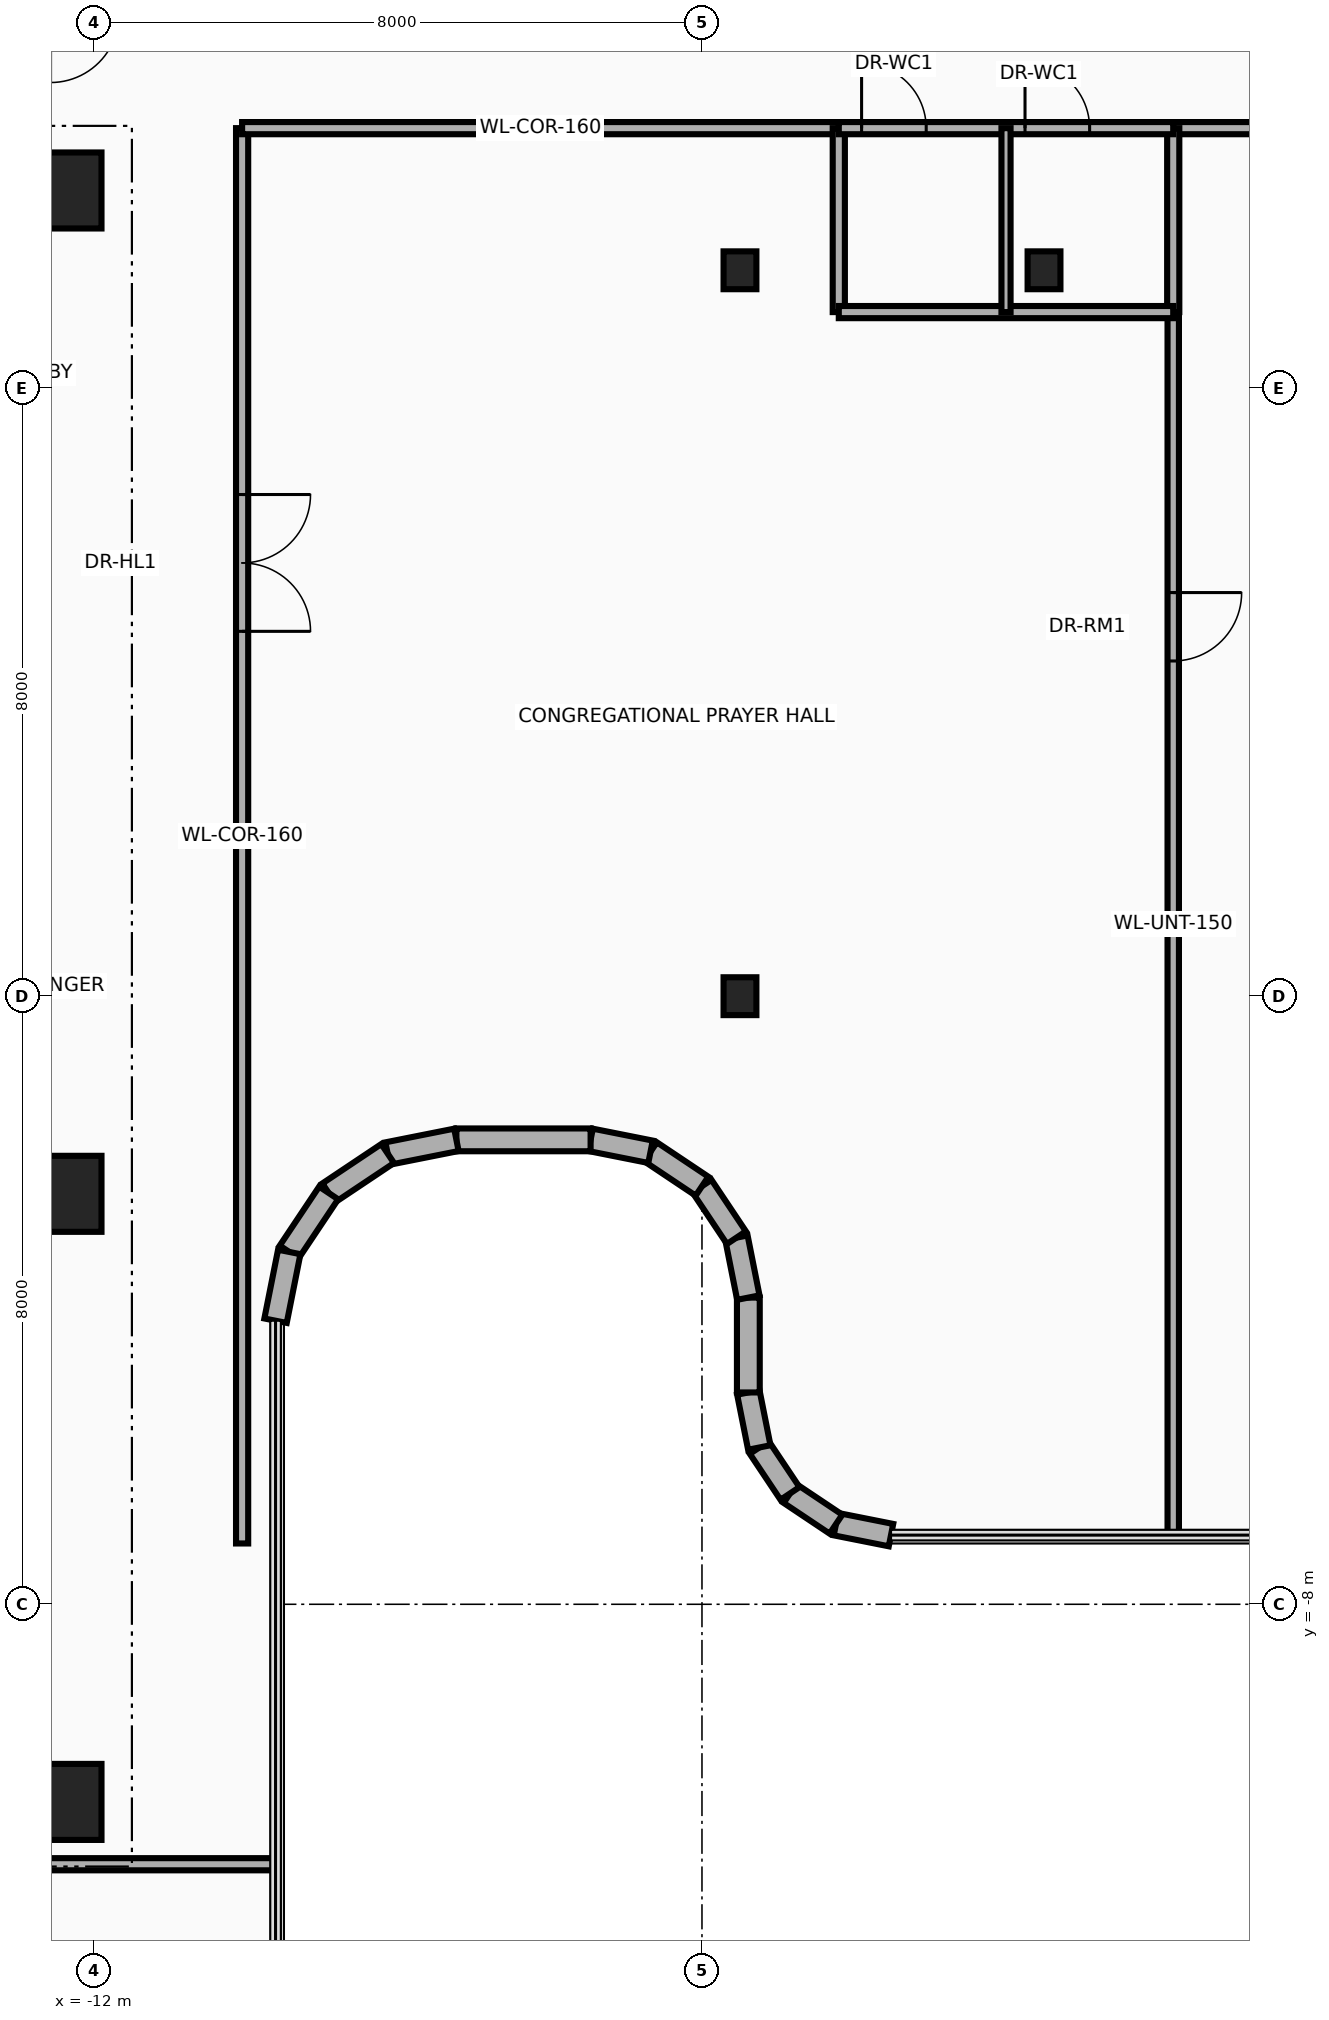
"""IFC4 building model, lengths in metres.
Left out: names, types, materials, properties, quantities, classifications, styles, units other than length and angle.
Written with IfcOpenShell. Run it as: python <this file> out.ifc"""

import sys

from ifc_helpers import new_model, si_unit, direction, frame, frame_2d, origin, origin_2d, place, context, subcontext, project, spatial, rectangle, i_section, extrude, source, transform, mapped, element, fill, save


model = new_model("IFC4")
c1 = context("Model", 3, precision=1e-05, world=origin(), true_north=direction((0.0, 1.0)))
c2 = subcontext(c1, "Body", "Model", "MODEL_VIEW")
j1 = project(units=[si_unit("LENGTHUNIT", "METRE"), si_unit("PLANEANGLEUNIT", "RADIAN")], contexts=[c1])
p1 = place(None, origin())
s1 = spatial("IfcSite", under=j1, at=p1, CompositionType="ELEMENT")
p2 = place(p1, origin())
s2 = spatial("IfcBuilding", under=s1, at=p2, CompositionType="ELEMENT")
p3 = place(p2, frame((0.0, 0.0, 188.4)))
s3 = spatial("IfcBuildingStorey", under=s2, at=p3, CompositionType="ELEMENT", Elevation=188.4)
for number, where, z_axis, x_axis in (
    (1, (-22.65, 10.8, 0.0), (0.0, 0.0, 1.0), (1.0, 0.0, 0.0)),
    (2, (-22.65, -10.8, 0.0), (0.0, 0.0, 1.0), (1.0, 0.0, 0.0)),
):
    element("IfcWall", number, at=place(p3, frame(where, z_axis=z_axis, x_axis=x_axis)), inside=s3, PredefinedType="SHEAR", context=c2, shape_type="SweptSolid", body=[
        extrude(rectangle(XDim=10.25, YDim=0.55, at=frame_2d((5.125, 0.0))), origin(), (0.0, 0.0, 1.0), 3.63),
    ])
m1 = source(origin(), c2, "Body", "SweptSolid", [
    extrude(rectangle(XDim=1.0, YDim=1.0, at=origin_2d()), origin(), (0.0, 0.0, 1.0), 3.95),
])
for number, where, z_axis, x_axis in (
    (3, (-12.4, -10.6, 0.0), (0.0, 0.0, 1.0), (1.0, 0.0, 0.0)),
    (4, (-12.4, -2.6, 0.0), (0.0, 0.0, 1.0), (1.0, 0.0, 0.0)),
    (5, (-12.4, 10.6, 0.0), (0.0, 0.0, 1.0), (1.0, 0.0, 0.0)),
):
    element("IfcColumn", number, at=place(p3, frame(where, z_axis=z_axis, x_axis=x_axis)), inside=s3, PredefinedType="COLUMN", context=c2, shape_type="MappedRepresentation", body=[
        mapped(m1, transform((0.0, 0.0, 0.0), x_axis=(1.0, 0.0, 0.0), y_axis=(0.0, 1.0, 0.0), z_axis=(0.0, 0.0, 1.0), scale=1.0)),
    ])
m2 = source(origin(), c2, "Body", "SweptSolid", [
    extrude(i_section(OverallWidth=0.432, OverallDepth=0.498, WebThickness=0.056, FlangeThickness=0.089, at=origin_2d()), origin(), (0.0, 0.0, 1.0), 3.95),
])
for number, where, z_axis, x_axis in (
    (6, (-3.5, 0.0, 0.0), (0.0, 0.0, 1.0), (1.0, 0.0, 0.0)),
    (7, (-3.5, 9.55, 0.0), (0.0, 0.0, 1.0), (1.0, 0.0, 0.0)),
    (8, (0.5, 9.55, 0.0), (0.0, 0.0, 1.0), (1.0, 0.0, 0.0)),
):
    element("IfcColumn", number, at=place(p3, frame(where, z_axis=z_axis, x_axis=x_axis)), inside=s3, PredefinedType="COLUMN", context=c2, shape_type="MappedRepresentation", body=[
        mapped(m2, transform((0.0, 0.0, 0.0), x_axis=(1.0, 0.0, 0.0), y_axis=(0.0, 1.0, 0.0), z_axis=(0.0, 0.0, 1.0), scale=1.0)),
    ])
p4 = place(p3, frame((-1.513, -7.09, 0.0), z_axis=(0.0, 0.0, 1.0), x_axis=(-0.980783640462, 0.195098566376, 0.0)))
e9 = element("IfcWall", 9, at=p4, inside=s3, PredefinedType="SOLIDWALL", context=c2, shape_type="SweptSolid", body=[
    extrude(rectangle(XDim=0.738, YDim=0.3, at=frame_2d((0.369, 0.0))), origin(), (0.0, 0.0, 1.0), 3.076),
])
p5 = place(p3, frame((-2.237, -6.946, 0.0), z_axis=(0.0, 0.0, 1.0), x_axis=(-0.831378135196, 0.555707113792, 0.0)))
e10 = element("IfcWall", 10, at=p5, inside=s3, PredefinedType="SOLIDWALL", context=c2, shape_type="SweptSolid", body=[
    extrude(rectangle(XDim=0.727, YDim=0.3, at=frame_2d((0.364, 0.0))), origin(), (0.0, 0.0, 1.0), 3.63),
])
p6 = place(p3, frame((-2.842, -6.542, 0.0), z_axis=(0.0, 0.0, 1.0), x_axis=(-0.555784030735, 0.83132671747, 0.0)))
e11 = element("IfcWall", 11, at=p6, inside=s3, PredefinedType="SOLIDWALL", context=c2, shape_type="SweptSolid", body=[
    extrude(rectangle(XDim=0.728, YDim=0.3, at=frame_2d((0.364, 0.0))), origin(), (0.0, 0.0, 1.0), 2.615),
])
p7 = place(p3, frame((-3.246, -5.937, 0.0), z_axis=(0.0, 0.0, 1.0), x_axis=(-0.194780446724, 0.980846867546, 0.0)))
e12 = element("IfcWall", 12, at=p7, inside=s3, PredefinedType="SOLIDWALL", context=c2, shape_type="SweptSolid", body=[
    extrude(rectangle(XDim=0.738, YDim=0.3, at=frame_2d((0.369, 0.0))), origin(), (0.0, 0.0, 1.0), 2.615),
])
p8 = place(p3, frame((-3.39, -5.213, 0.0), z_axis=(0.0, 0.0, 1.0), x_axis=(0.0, 1.0, 0.0)))
e13 = element("IfcWall", 13, at=p8, inside=s3, PredefinedType="SOLIDWALL", context=c2, shape_type="SweptSolid", body=[
    extrude(rectangle(XDim=1.248, YDim=0.3, at=frame_2d((0.624, 0.0))), origin(), (0.0, 0.0, 1.0), 2.615),
])
p9 = place(p3, frame((-3.39, -3.965, 0.0), z_axis=(0.0, 0.0, 1.0), x_axis=(-0.195356525272, 0.980732291726, 0.0)))
e14 = element("IfcWall", 14, at=p9, inside=s3, PredefinedType="SOLIDWALL", context=c2, shape_type="SweptSolid", body=[
    extrude(rectangle(XDim=0.803, YDim=0.3, at=frame_2d((0.402, 0.0))), origin(), (0.0, 0.0, 1.0), 2.615),
])
for number, where, z_axis, x_axis in (
    (15, (-3.547, -3.177, 0.0), (0.0, 0.0, 1.0), (-0.556, 0.831, 0.0)),
    (16, (-4.0, -2.5, 0.0), (0.0, 0.0, 1.0), (-0.831, 0.556, 0.0)),
):
    element("IfcWall", number, at=place(p3, frame(where, z_axis=z_axis, x_axis=x_axis)), inside=s3, PredefinedType="SOLIDWALL", context=c2, shape_type="SweptSolid", body=[
        extrude(rectangle(XDim=0.815, YDim=0.3, at=frame_2d((0.407, 0.0))), origin(), (0.0, 0.0, 1.0), 2.615),
    ])
p10 = place(p3, frame((-4.677, -2.047, 0.0), z_axis=(0.0, 0.0, 1.0), x_axis=(-0.980732291726, 0.195356525272, 0.0)))
e17 = element("IfcWall", 17, at=p10, inside=s3, PredefinedType="SOLIDWALL", context=c2, shape_type="SweptSolid", body=[
    extrude(rectangle(XDim=0.803, YDim=0.3, at=frame_2d((0.402, 0.0))), origin(), (0.0, 0.0, 1.0), 3.63),
])
p11 = place(p3, frame((-5.465, -1.89, 0.0), z_axis=(0.0, 0.0, 1.0), x_axis=(-1.0, 0.0, 0.0)))
e18 = element("IfcWall", 18, at=p11, inside=s3, PredefinedType="SOLIDWALL", context=c2, shape_type="SweptSolid", body=[
    extrude(rectangle(XDim=1.766, YDim=0.3, at=frame_2d((0.883, 0.0))), origin(), (0.0, 0.0, 1.0), 3.63),
])
p12 = place(p3, frame((-7.231, -1.89, 0.0), z_axis=(0.0, 0.0, 1.0), x_axis=(-0.980743190895, -0.195301801101, 0.0)))
e19 = element("IfcWall", 19, at=p12, inside=s3, PredefinedType="SOLIDWALL", context=c2, shape_type="SweptSolid", body=[
    extrude(rectangle(XDim=0.923, YDim=0.3, at=frame_2d((0.461, 0.0))), origin(), (0.0, 0.0, 1.0), 2.415),
])
p13 = place(p3, frame((-8.135, -2.07, 0.0), z_axis=(0.0, 0.0, 1.0), x_axis=(-0.831607331814, -0.555364065883, 0.0)))
e20 = element("IfcWall", 20, at=p13, inside=s3, PredefinedType="SOLIDWALL", context=c2, shape_type="SweptSolid", body=[
    extrude(rectangle(XDim=0.933, YDim=0.3, at=frame_2d((0.467, 0.0))), origin(), (0.0, 0.0, 1.0), 2.415),
])
p14 = place(p3, frame((-8.912, -2.588, 0.0), z_axis=(0.0, 0.0, 1.0), x_axis=(-0.555364065883, -0.831607331814, 0.0)))
e21 = element("IfcWall", 21, at=p14, inside=s3, PredefinedType="SOLIDWALL", context=c2, shape_type="SweptSolid", body=[
    extrude(rectangle(XDim=0.933, YDim=0.3, at=frame_2d((0.467, 0.0))), origin(), (0.0, 0.0, 1.0), 3.63),
])
p15 = place(p3, frame((-9.43, -3.365, 0.0), z_axis=(0.0, 0.0, 1.0), x_axis=(-0.195301801101, -0.980743190895, 0.0)))
e22 = element("IfcWall", 22, at=p15, inside=s3, PredefinedType="SOLIDWALL", context=c2, shape_type="SweptSolid", body=[
    extrude(rectangle(XDim=0.923, YDim=0.3, at=frame_2d((0.461, 0.0))), origin(), (0.0, 0.0, 1.0), 3.63),
])
p16 = place(p3, frame((-23.45, -11.42, 0.0), z_axis=(0.0, 0.0, 1.0), x_axis=(1.0, 0.0, 0.0)))
e23 = element("IfcWall", 23, at=p16, inside=s3, PredefinedType="PARTITIONING", context=c2, shape_type="SweptSolid", body=[
    extrude(rectangle(XDim=13.84, YDim=0.16, at=frame_2d((6.92, 0.0))), origin(), (0.0, 0.0, 1.0), 3.004),
])
p17 = place(p3, frame((-10.05, -7.2, 0.0), z_axis=(0.0, 0.0, 1.0), x_axis=(0.0, 1.0, 0.0)))
e24 = element("IfcWall", 24, at=p17, inside=s3, PredefinedType="PARTITIONING", context=c2, shape_type="SweptSolid", body=[
    extrude(rectangle(XDim=18.62, YDim=0.16, at=frame_2d((9.31, 0.0))), origin(), (0.0, 0.0, 1.0), 2.415),
])
p18 = place(p17, frame((12.0, 0.0, 0.0)))
e25 = element("IfcOpeningElement", 25, at=p18, cuts=e24, PredefinedType="OPENING", context=c2, shape_type="SweptSolid", body=[
    extrude(rectangle(XDim=1.8, YDim=2.15, at=frame_2d((0.9, 1.075))), frame((0.0, 0.095, 0.0), z_axis=(0.0, -1.0, 0.0), x_axis=(1.0, 0.0, 0.0)), (0.0, 0.0, 1.0), 0.19),
])
p19 = place(p3, frame((-10.05, 11.42, 0.0), z_axis=(0.0, 0.0, 1.0), x_axis=(1.0, 0.0, 0.0)))
e26 = element("IfcWall", 26, at=p19, inside=s3, PredefinedType="PARTITIONING", context=c2, shape_type="SweptSolid", body=[
    extrude(rectangle(XDim=7.85, YDim=0.16, at=frame_2d((3.925, 0.0))), origin(), (0.0, 0.0, 1.0), 2.615),
])
p20 = place(p3, frame((2.2, 11.42, 0.0), z_axis=(0.0, 0.0, 1.0), x_axis=(1.0, 0.0, 0.0)))
e27 = element("IfcWall", 27, at=p20, inside=s3, PredefinedType="PARTITIONING", context=c2, shape_type="SweptSolid", body=[
    extrude(rectangle(XDim=11.22, YDim=0.16, at=frame_2d((5.61, 0.0))), origin(), (0.0, 0.0, 1.0), 2.615),
])
p21 = place(p20, frame((4.0, 0.0, 0.0)))
e28 = element("IfcOpeningElement", 28, at=p21, cuts=e27, PredefinedType="OPENING", context=c2, shape_type="SweptSolid", body=[
    extrude(rectangle(XDim=1.8, YDim=2.15, at=frame_2d((0.9, 1.075))), frame((0.0, 0.095, 0.0), z_axis=(0.0, -1.0, 0.0), x_axis=(1.0, 0.0, 0.0)), (0.0, 0.0, 1.0), 0.19),
])
p22 = place(p3, frame((2.2, -7.09, 0.0), z_axis=(0.0, 0.0, 1.0), x_axis=(0.0, 1.0, 0.0)))
e29 = element("IfcWall", 29, at=p22, inside=s3, PredefinedType="PARTITIONING", context=c2, shape_type="SweptSolid", body=[
    extrude(rectangle(XDim=16.09, YDim=0.15, at=frame_2d((8.045, 0.0))), origin(), (0.0, 0.0, 1.0), 2.665),
])
p23 = place(p22, frame((11.5, 0.0, 0.0)))
e30 = element("IfcOpeningElement", 30, at=p23, cuts=e29, PredefinedType="OPENING", context=c2, shape_type="SweptSolid", body=[
    extrude(rectangle(XDim=0.9, YDim=2.1, at=frame_2d((0.45, 1.05))), frame((0.0, 0.09, 0.0), z_axis=(0.0, -1.0, 0.0), x_axis=(1.0, 0.0, 0.0)), (0.0, 0.0, 1.0), 0.18),
])
for number, where, z_axis, x_axis in (
    (31, (-2.2, 9.0, 0.0), (0.0, 0.0, 1.0), (0.0, 1.0, 0.0)),
    (32, (2.2, 9.0, 0.0), (0.0, 0.0, 1.0), (0.0, 1.0, 0.0)),
):
    element("IfcWall", number, at=place(p3, frame(where, z_axis=z_axis, x_axis=x_axis)), inside=s3, PredefinedType="PARTITIONING", context=c2, shape_type="SweptSolid", body=[
        extrude(rectangle(XDim=2.42, YDim=0.16, at=frame_2d((1.21, 0.0))), origin(), (0.0, 0.0, 1.0), 2.665),
    ])
p24 = place(p3, frame((-2.2, 9.0, 0.0), z_axis=(0.0, 0.0, 1.0), x_axis=(1.0, 0.0, 0.0)))
e33 = element("IfcWall", 33, at=p24, inside=s3, PredefinedType="PARTITIONING", context=c2, shape_type="SweptSolid", body=[
    extrude(rectangle(XDim=4.4, YDim=0.16, at=frame_2d((2.2, 0.0))), origin(), (0.0, 0.0, 1.0), 3.63),
])
p25 = place(p3, frame((-2.2, 11.42, 0.0), z_axis=(0.0, 0.0, 1.0), x_axis=(1.0, 0.0, 0.0)))
e34 = element("IfcWall", 34, at=p25, inside=s3, PredefinedType="PARTITIONING", context=c2, shape_type="SweptSolid", body=[
    extrude(rectangle(XDim=4.4, YDim=0.16, at=frame_2d((2.2, 0.0))), origin(), (0.0, 0.0, 1.0), 3.63),
])
p26 = place(p25, frame((0.3, 0.0, 0.0)))
e35 = element("IfcOpeningElement", 35, at=p26, cuts=e34, PredefinedType="OPENING", context=c2, shape_type="SweptSolid", body=[
    extrude(rectangle(XDim=0.85, YDim=2.1, at=frame_2d((0.425, 1.05))), frame((0.0, 0.095, 0.0), z_axis=(0.0, -1.0, 0.0), x_axis=(1.0, 0.0, 0.0)), (0.0, 0.0, 1.0), 0.19),
])
p27 = place(p25, frame((2.45, 0.0, 0.0)))
e36 = element("IfcOpeningElement", 36, at=p27, cuts=e34, PredefinedType="OPENING", context=c2, shape_type="SweptSolid", body=[
    extrude(rectangle(XDim=0.85, YDim=2.1, at=frame_2d((0.425, 1.05))), frame((0.0, 0.095, 0.0), z_axis=(0.0, -1.0, 0.0), x_axis=(1.0, 0.0, 0.0)), (0.0, 0.0, 1.0), 0.19),
])
p28 = place(p3, frame((0.0, 9.0, 0.0), z_axis=(0.0, 0.0, 1.0), x_axis=(0.0, 1.0, 0.0)))
e37 = element("IfcWall", 37, at=p28, inside=s3, PredefinedType="PARTITIONING", context=c2, shape_type="SweptSolid", body=[
    extrude(rectangle(XDim=2.42, YDim=0.12, at=frame_2d((1.21, 0.0))), origin(), (0.0, 0.0, 1.0), 2.665),
])
p29 = place(p18, frame((1.8, 0.0, 0.0), z_axis=(0.0, 0.0, 1.0), x_axis=(-1.0, 0.0, 0.0)))
e38 = element("IfcDoor", 38, at=p29, inside=s3, OperationType="DOUBLE_DOOR_SINGLE_SWING", PredefinedType="DOOR", context=c2, shape_type="SweptSolid", body=[
    extrude(rectangle(XDim=1.8, YDim=2.15, at=frame_2d((0.9, 1.075))), frame((0.0, 0.025, 0.0), z_axis=(0.0, -1.0, 0.0), x_axis=(1.0, 0.0, 0.0)), (0.0, 0.0, 1.0), 0.05),
])
fill(e25, e38)
p30 = place(p23, frame((0.9, 0.0, 0.0), z_axis=(0.0, 0.0, 1.0), x_axis=(-1.0, 0.0, 0.0)))
e39 = element("IfcDoor", 39, at=p30, inside=s3, OperationType="SINGLE_SWING_LEFT", PredefinedType="DOOR", context=c2, shape_type="SweptSolid", body=[
    extrude(rectangle(XDim=0.9, YDim=2.1, at=frame_2d((0.45, 1.05))), frame((0.0, 0.025, 0.0), z_axis=(0.0, -1.0, 0.0), x_axis=(1.0, 0.0, 0.0)), (0.0, 0.0, 1.0), 0.05),
])
fill(e30, e39)
p31 = place(p26, origin())
e40 = element("IfcDoor", 40, at=p31, inside=s3, OperationType="SINGLE_SWING_RIGHT", PredefinedType="DOOR", context=c2, shape_type="SweptSolid", body=[
    extrude(rectangle(XDim=0.85, YDim=2.1, at=frame_2d((0.425, 1.05))), frame((0.0, 0.025, 0.0), z_axis=(0.0, -1.0, 0.0), x_axis=(1.0, 0.0, 0.0)), (0.0, 0.0, 1.0), 0.05),
])
fill(e35, e40)
p32 = place(p27, origin())
e41 = element("IfcDoor", 41, at=p32, inside=s3, OperationType="SINGLE_SWING_LEFT", PredefinedType="DOOR", context=c2, shape_type="SweptSolid", body=[
    extrude(rectangle(XDim=0.85, YDim=2.1, at=frame_2d((0.425, 1.05))), frame((0.0, 0.025, 0.0), z_axis=(0.0, -1.0, 0.0), x_axis=(1.0, 0.0, 0.0)), (0.0, 0.0, 1.0), 0.05),
])
fill(e36, e41)
save(model, sys.argv[1])
